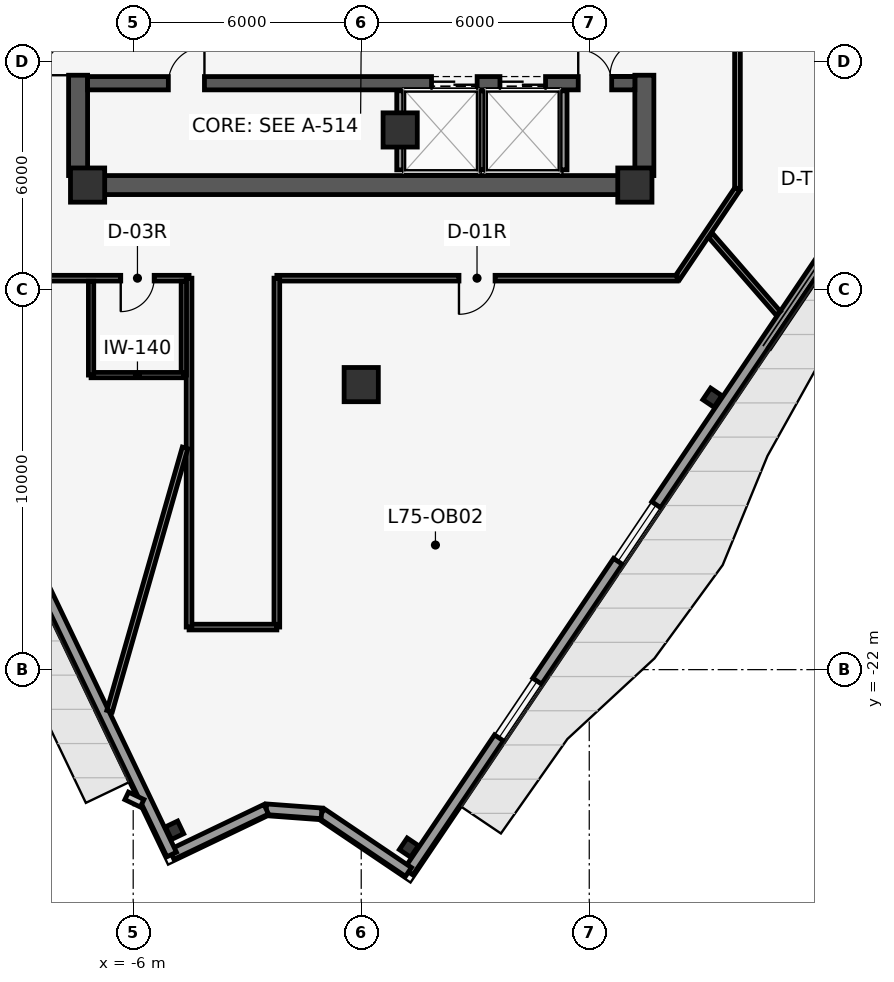
"""IFC4 building model, lengths in metres.
Left out: names, types, materials, properties, quantities, classifications, styles, units other than length and angle.
Written with IfcOpenShell. Run it as: python <this file> out.ifc"""

import sys

from ifc_helpers import new_model, si_unit, direction, frame, frame_2d, origin, origin_2d, place, context, subcontext, project, spatial, rectangle, i_section, extrude, element, fill, save


model = new_model("IFC4")
c1 = context("Model", 3, precision=1e-05, world=origin(), true_north=direction((0.0, 1.0)))
c2 = subcontext(c1, "Body", "Model", "MODEL_VIEW")
j1 = project(units=[si_unit("LENGTHUNIT", "METRE"), si_unit("PLANEANGLEUNIT", "RADIAN")], contexts=[c1])
p1 = place(None, origin())
s1 = spatial("IfcSite", under=j1, at=p1, CompositionType="ELEMENT")
p2 = place(p1, origin())
s2 = spatial("IfcBuilding", under=s1, at=p2, CompositionType="ELEMENT")
p3 = place(p2, frame((0.0, 0.0, 318.8)))
s3 = spatial("IfcBuildingStorey", under=s2, at=p3, CompositionType="ELEMENT", Elevation=318.8)
p4 = place(p3, frame((-7.45, -9.0, 0.0), z_axis=(0.0, 0.0, 1.0), x_axis=(0.0, 1.0, 0.0)))
e1 = element("IfcWall", 1, at=p4, inside=s3, PredefinedType="SHEAR", context=c2, shape_type="SweptSolid", body=[
    extrude(rectangle(XDim=9.1, YDim=0.5, at=frame_2d((4.55, 0.0))), origin(), (0.0, 0.0, 1.0), 4.32),
])
p5 = place(p4, frame((2.64, 0.0, 0.0)))
e2 = element("IfcOpeningElement", 2, at=p5, cuts=e1, PredefinedType="OPENING", context=c2, shape_type="SweptSolid", body=[
    extrude(rectangle(XDim=1.8, YDim=2.2, at=frame_2d((0.9, 1.1))), frame((0.0, 0.26, 0.0), z_axis=(0.0, -1.0, 0.0), x_axis=(1.0, 0.0, 0.0)), (0.0, 0.0, 1.0), 0.52),
])
p6 = place(p4, frame((7.55, 0.0, 0.0)))
e3 = element("IfcOpeningElement", 3, at=p6, cuts=e1, PredefinedType="OPENING", context=c2, shape_type="SweptSolid", body=[
    extrude(rectangle(XDim=1.2, YDim=2.15, at=frame_2d((0.6, 1.075))), frame((0.0, 0.26, 0.0), z_axis=(0.0, -1.0, 0.0), x_axis=(1.0, 0.0, 0.0)), (0.0, 0.0, 1.0), 0.52),
])
p7 = place(p3, frame((7.45, -9.0, 0.0), z_axis=(0.0, 0.0, 1.0), x_axis=(0.0, 1.0, 0.0)))
e4 = element("IfcWall", 4, at=p7, inside=s3, PredefinedType="SHEAR", context=c2, shape_type="SweptSolid", body=[
    extrude(rectangle(XDim=9.1, YDim=0.5, at=frame_2d((4.55, 0.0))), origin(), (0.0, 0.0, 1.0), 4.32),
])
p8 = place(p7, frame((2.64, 0.0, 0.0)))
e5 = element("IfcOpeningElement", 5, at=p8, cuts=e4, PredefinedType="OPENING", context=c2, shape_type="SweptSolid", body=[
    extrude(rectangle(XDim=1.8, YDim=2.2, at=frame_2d((0.9, 1.1))), frame((0.0, 0.26, 0.0), z_axis=(0.0, -1.0, 0.0), x_axis=(1.0, 0.0, 0.0)), (0.0, 0.0, 1.0), 0.52),
])
p9 = place(p7, frame((7.55, 0.0, 0.0)))
e6 = element("IfcOpeningElement", 6, at=p9, cuts=e4, PredefinedType="OPENING", context=c2, shape_type="SweptSolid", body=[
    extrude(rectangle(XDim=1.2, YDim=2.15, at=frame_2d((0.6, 1.075))), frame((0.0, 0.26, 0.0), z_axis=(0.0, -1.0, 0.0), x_axis=(1.0, 0.0, 0.0)), (0.0, 0.0, 1.0), 0.52),
])
p10 = place(p3, frame((-7.45, -9.25, 0.0), z_axis=(0.0, 0.0, 1.0), x_axis=(1.0, 0.0, 0.0)))
e7 = element("IfcWall", 7, at=p10, inside=s3, PredefinedType="SHEAR", context=c2, shape_type="SweptSolid", body=[
    extrude(rectangle(XDim=14.9, YDim=0.5, at=frame_2d((7.45, 0.0))), origin(), (0.0, 0.0, 1.0), 4.32),
])
p11 = place(p3, frame((-7.2, -6.57, 0.0), z_axis=(0.0, 0.0, 1.0), x_axis=(1.0, 0.0, 0.0)))
e8 = element("IfcWall", 8, at=p11, inside=s3, PredefinedType="SHEAR", context=c2, shape_type="SweptSolid", body=[
    extrude(rectangle(XDim=14.4, YDim=0.35, at=frame_2d((7.2, 0.0))), origin(), (0.0, 0.0, 1.0), 4.32),
])
p12 = place(p11, frame((9.05, 0.0, 0.0)))
e9 = element("IfcOpeningElement", 9, at=p12, cuts=e8, PredefinedType="OPENING", context=c2, shape_type="SweptSolid", body=[
    extrude(rectangle(XDim=1.2, YDim=2.25, at=frame_2d((0.6, 1.125))), frame((0.0, 0.185, 0.0), z_axis=(0.0, -1.0, 0.0), x_axis=(1.0, 0.0, 0.0)), (0.0, 0.0, 1.0), 0.37),
])
p13 = place(p11, frame((10.85, 0.0, 0.0)))
e10 = element("IfcOpeningElement", 10, at=p13, cuts=e8, PredefinedType="OPENING", context=c2, shape_type="SweptSolid", body=[
    extrude(rectangle(XDim=1.2, YDim=2.25, at=frame_2d((0.6, 1.125))), frame((0.0, 0.185, 0.0), z_axis=(0.0, -1.0, 0.0), x_axis=(1.0, 0.0, 0.0)), (0.0, 0.0, 1.0), 0.37),
])
p14 = place(p11, frame((2.125, 0.0, 0.0)))
e11 = element("IfcOpeningElement", 11, at=p14, cuts=e8, PredefinedType="OPENING", context=c2, shape_type="SweptSolid", body=[
    extrude(rectangle(XDim=0.95, YDim=2.15, at=frame_2d((0.475, 1.075))), frame((0.0, 0.185, 0.0), z_axis=(0.0, -1.0, 0.0), x_axis=(1.0, 0.0, 0.0)), (0.0, 0.0, 1.0), 0.37),
])
p15 = place(p11, frame((12.91, 0.0, 0.0)))
e12 = element("IfcOpeningElement", 12, at=p15, cuts=e8, PredefinedType="OPENING", context=c2, shape_type="SweptSolid", body=[
    extrude(rectangle(XDim=0.88, YDim=2.15, at=frame_2d((0.44, 1.075))), frame((0.0, 0.185, 0.0), z_axis=(0.0, -1.0, 0.0), x_axis=(1.0, 0.0, 0.0)), (0.0, 0.0, 1.0), 0.37),
])
for number, where, z_axis, x_axis in (
    (13, (-7.2, -9.25, 0.0), (0.0, 0.0, 1.0), (1.0, 0.0, 0.0)),
    (14, (7.2, -9.25, 0.0), (0.0, 0.0, 1.0), (1.0, 0.0, 0.0)),
    (15, (1.025, -7.8, 0.0), (0.0, 0.0, 1.0), (1.0, 0.0, 0.0)),
    (16, (0.0, -14.5, 0.0), (0.0, 0.0, 1.0), (1.0, 0.0, 0.0)),
):
    element("IfcColumn", number, at=place(p3, frame(where, z_axis=z_axis, x_axis=x_axis)), inside=s3, PredefinedType="COLUMN", context=c2, shape_type="SweptSolid", body=[
        extrude(rectangle(XDim=0.9, YDim=0.9, at=origin_2d()), origin(), (0.0, 0.0, 1.0), 4.6),
    ])
for number, where, z_axis, x_axis in (
    (17, (-4.912, -26.227, 0.0), (0.0, 0.0, 1.0), (-0.431, 0.902, 0.0)),
    (18, (1.254, -26.682, 0.0), (0.0, 0.0, 1.0), (0.559, 0.829, 0.0)),
    (19, (9.239, -14.844, 0.0), (0.0, 0.0, 1.0), (0.559, 0.829, 0.0)),
):
    element("IfcColumn", number, at=place(p3, frame(where, z_axis=z_axis, x_axis=x_axis)), inside=s3, PredefinedType="COLUMN", context=c2, shape_type="SweptSolid", body=[
        extrude(i_section(OverallWidth=0.368, OverallDepth=0.356, WebThickness=0.011, FlangeThickness=0.018, at=origin_2d()), origin(), (0.0, 0.0, 1.0), 4.6),
    ])
p16 = place(p3, frame((25.8, 9.083, 0.0), z_axis=(0.0, 0.0, 1.0), x_axis=(-0.55919392155, -0.829036885851, 0.0)))
e20 = element("IfcWall", 20, at=p16, inside=s3, PredefinedType="STANDARD", context=c2, shape_type="SweptSolid", body=[
    extrude(rectangle(XDim=43.915, YDim=0.28, at=frame_2d((21.958, 0.0))), origin(), (0.0, 0.0, 1.0), 4.32),
])
p17 = place(p16, frame((21.457, 0.0, 0.0)))
e21 = element("IfcOpeningElement", 21, at=p17, cuts=e20, PredefinedType="OPENING", context=c2, shape_type="SweptSolid", body=[
    extrude(rectangle(XDim=1.0, YDim=2.15, at=frame_2d((0.5, 1.075))), frame((0.0, 0.15, 0.0), z_axis=(0.0, -1.0, 0.0), x_axis=(1.0, 0.0, 0.0)), (0.0, 0.0, 1.0), 0.3),
])
p18 = place(p16, frame((4.257, 0.0, 0.85)))
e22 = element("IfcOpeningElement", 22, at=p18, cuts=e20, PredefinedType="OPENING", context=c2, shape_type="SweptSolid", body=[
    extrude(rectangle(XDim=1.8, YDim=2.4, at=frame_2d((0.9, 1.2))), frame((0.0, 0.15, 0.0), z_axis=(0.0, -1.0, 0.0), x_axis=(1.0, 0.0, 0.0)), (0.0, 0.0, 1.0), 0.3),
])
p19 = place(p16, frame((9.857, 0.0, 0.85)))
e23 = element("IfcOpeningElement", 23, at=p19, cuts=e20, PredefinedType="OPENING", context=c2, shape_type="SweptSolid", body=[
    extrude(rectangle(XDim=1.8, YDim=2.4, at=frame_2d((0.9, 1.2))), frame((0.0, 0.15, 0.0), z_axis=(0.0, -1.0, 0.0), x_axis=(1.0, 0.0, 0.0)), (0.0, 0.0, 1.0), 0.3),
])
p20 = place(p16, frame((32.257, 0.0, 0.85)))
e24 = element("IfcOpeningElement", 24, at=p20, cuts=e20, PredefinedType="OPENING", context=c2, shape_type="SweptSolid", body=[
    extrude(rectangle(XDim=1.8, YDim=2.4, at=frame_2d((0.9, 1.2))), frame((0.0, 0.15, 0.0), z_axis=(0.0, -1.0, 0.0), x_axis=(1.0, 0.0, 0.0)), (0.0, 0.0, 1.0), 0.3),
])
p21 = place(p16, frame((37.857, 0.0, 0.85)))
e25 = element("IfcOpeningElement", 25, at=p21, cuts=e20, PredefinedType="OPENING", context=c2, shape_type="SweptSolid", body=[
    extrude(rectangle(XDim=1.8, YDim=2.4, at=frame_2d((0.9, 1.2))), frame((0.0, 0.15, 0.0), z_axis=(0.0, -1.0, 0.0), x_axis=(1.0, 0.0, 0.0)), (0.0, 0.0, 1.0), 0.3),
])
p22 = place(p3, frame((1.243, -27.324, 0.0), z_axis=(0.0, 0.0, 1.0), x_axis=(-0.829015842911, 0.559225117643, 0.0)))
e26 = element("IfcWall", 26, at=p22, inside=s3, PredefinedType="STANDARD", context=c2, shape_type="SweptSolid", body=[
    extrude(rectangle(XDim=2.759, YDim=0.28, at=frame_2d((1.379, 0.0))), origin(), (0.0, 0.0, 1.0), 4.32),
])
p23 = place(p3, frame((-1.044, -25.781, 0.0), z_axis=(0.0, 0.0, 1.0), x_axis=(-0.997286893261, 0.073612855735, 0.0)))
e27 = element("IfcWall", 27, at=p23, inside=s3, PredefinedType="STANDARD", context=c2, shape_type="SweptSolid", body=[
    extrude(rectangle(XDim=1.459, YDim=0.28, at=frame_2d((0.729, 0.0))), origin(), (0.0, 0.0, 1.0), 4.32),
])
p24 = place(p3, frame((-2.5, -25.674, 0.0), z_axis=(0.0, 0.0, 1.0), x_axis=(-0.902044352952, -0.431643354296, 0.0)))
e28 = element("IfcWall", 28, at=p24, inside=s3, PredefinedType="STANDARD", context=c2, shape_type="SweptSolid", body=[
    extrude(rectangle(XDim=2.759, YDim=0.28, at=frame_2d((1.379, 0.0))), origin(), (0.0, 0.0, 1.0), 4.32),
])
p25 = place(p3, frame((-4.988, -26.865, 0.0), z_axis=(0.0, 0.0, 1.0), x_axis=(-0.431592936847, 0.902068476815, 0.0)))
e29 = element("IfcWall", 29, at=p25, inside=s3, PredefinedType="STANDARD", context=c2, shape_type="SweptSolid", body=[
    extrude(rectangle(XDim=43.18, YDim=0.28, at=frame_2d((21.59, 0.0))), origin(), (0.0, 0.0, 1.0), 4.32),
])
p26 = place(p25, frame((18.499, 0.0, 0.0)))
e30 = element("IfcOpeningElement", 30, at=p26, cuts=e29, PredefinedType="OPENING", context=c2, shape_type="SweptSolid", body=[
    extrude(rectangle(XDim=1.0, YDim=2.15, at=frame_2d((0.5, 1.075))), frame((0.0, 0.15, 0.0), z_axis=(0.0, -1.0, 0.0), x_axis=(1.0, 0.0, 0.0)), (0.0, 0.0, 1.0), 0.3),
])
p27 = place(p25, frame((9.49, 0.0, 0.85)))
e31 = element("IfcOpeningElement", 31, at=p27, cuts=e29, PredefinedType="OPENING", context=c2, shape_type="SweptSolid", body=[
    extrude(rectangle(XDim=1.8, YDim=2.4, at=frame_2d((0.9, 1.2))), frame((0.0, 0.15, 0.0), z_axis=(0.0, -1.0, 0.0), x_axis=(1.0, 0.0, 0.0)), (0.0, 0.0, 1.0), 0.3),
])
p28 = place(p25, frame((31.89, 0.0, 0.85)))
e32 = element("IfcOpeningElement", 32, at=p28, cuts=e29, PredefinedType="OPENING", context=c2, shape_type="SweptSolid", body=[
    extrude(rectangle(XDim=1.8, YDim=2.4, at=frame_2d((0.9, 1.2))), frame((0.0, 0.15, 0.0), z_axis=(0.0, -1.0, 0.0), x_axis=(1.0, 0.0, 0.0)), (0.0, 0.0, 1.0), 0.3),
])
p29 = place(p25, frame((37.49, 0.0, 0.85)))
e33 = element("IfcOpeningElement", 33, at=p29, cuts=e29, PredefinedType="OPENING", context=c2, shape_type="SweptSolid", body=[
    extrude(rectangle(XDim=1.8, YDim=2.4, at=frame_2d((0.9, 1.2))), frame((0.0, 0.15, 0.0), z_axis=(0.0, -1.0, 0.0), x_axis=(1.0, 0.0, 0.0)), (0.0, 0.0, 1.0), 0.3),
])
p30 = place(p3, frame((1.025, -8.85, 0.0), z_axis=(0.0, 0.0, 1.0), x_axis=(0.0, 1.0, 0.0)))
e34 = element("IfcWall", 34, at=p30, inside=s3, PredefinedType="PARTITIONING", context=c2, shape_type="SweptSolid", body=[
    extrude(rectangle(XDim=2.08, YDim=0.18, at=frame_2d((1.04, 0.0))), origin(), (0.0, 0.0, 1.0), 3.368),
])
p31 = place(p3, frame((3.175, -8.85, 0.0), z_axis=(0.0, 0.0, 1.0), x_axis=(0.0, 1.0, 0.0)))
e35 = element("IfcWall", 35, at=p31, inside=s3, PredefinedType="PARTITIONING", context=c2, shape_type="SweptSolid", body=[
    extrude(rectangle(XDim=2.08, YDim=0.15, at=frame_2d((1.04, 0.0))), origin(), (0.0, 0.0, 1.0), 4.32),
])
p32 = place(p3, frame((5.325, -8.85, 0.0), z_axis=(0.0, 0.0, 1.0), x_axis=(0.0, 1.0, 0.0)))
e36 = element("IfcWall", 36, at=p32, inside=s3, PredefinedType="PARTITIONING", context=c2, shape_type="SweptSolid", body=[
    extrude(rectangle(XDim=2.08, YDim=0.18, at=frame_2d((1.04, 0.0))), origin(), (0.0, 0.0, 1.0), 4.32),
])
p33 = place(p3, frame((-4.53, -11.7, 0.0), z_axis=(0.0, 0.0, 1.0), x_axis=(-1.0, 0.0, 0.0)))
e37 = element("IfcWall", 37, at=p33, inside=s3, PredefinedType="PARTITIONING", context=c2, shape_type="SweptSolid", body=[
    extrude(rectangle(XDim=4.526, YDim=0.15, at=frame_2d((2.263, 0.0))), origin(), (0.0, 0.0, 1.0), 4.32),
])
p34 = place(p33, frame((0.918, 0.0, 0.0)))
e38 = element("IfcOpeningElement", 38, at=p34, cuts=e37, PredefinedType="OPENING", context=c2, shape_type="SweptSolid", body=[
    extrude(rectangle(XDim=0.88, YDim=2.1, at=frame_2d((0.44, 1.05))), frame((0.0, 0.085, 0.0), z_axis=(0.0, -1.0, 0.0), x_axis=(1.0, 0.0, 0.0)), (0.0, 0.0, 1.0), 0.17),
])
p35 = place(p3, frame((9.9, 11.85, 0.0), z_axis=(0.0, 0.0, 1.0), x_axis=(0.0, -1.0, 0.0)))
e39 = element("IfcWall", 39, at=p35, inside=s3, PredefinedType="PARTITIONING", context=c2, shape_type="SweptSolid", body=[
    extrude(rectangle(XDim=21.198, YDim=0.15, at=frame_2d((10.599, 0.0))), origin(), (0.0, 0.0, 1.0), 4.32),
])
p36 = place(p35, frame((15.22, 0.0, 0.0)))
e40 = element("IfcOpeningElement", 40, at=p36, cuts=e39, PredefinedType="OPENING", context=c2, shape_type="SweptSolid", body=[
    extrude(rectangle(XDim=0.95, YDim=2.15, at=frame_2d((0.475, 1.075))), frame((0.0, 0.085, 0.0), z_axis=(0.0, -1.0, 0.0), x_axis=(1.0, 0.0, 0.0)), (0.0, 0.0, 1.0), 0.17),
])
p37 = place(p35, frame((4.875, 0.0, 0.0)))
e41 = element("IfcOpeningElement", 41, at=p37, cuts=e39, PredefinedType="OPENING", context=c2, shape_type="SweptSolid", body=[
    extrude(rectangle(XDim=0.95, YDim=2.15, at=frame_2d((0.475, 1.075))), frame((0.0, 0.085, 0.0), z_axis=(0.0, -1.0, 0.0), x_axis=(1.0, 0.0, 0.0)), (0.0, 0.0, 1.0), 0.17),
])
p38 = place(p3, frame((9.9, -9.348, 0.0), z_axis=(0.0, 0.0, 1.0), x_axis=(-0.559200828408, -0.829032227062, 0.0)))
e42 = element("IfcWall", 42, at=p38, inside=s3, PredefinedType="PARTITIONING", context=c2, shape_type="SweptSolid", body=[
    extrude(rectangle(XDim=2.836, YDim=0.15, at=frame_2d((1.418, 0.0))), origin(), (0.0, 0.0, 1.0), 4.32),
])
p39 = place(p3, frame((8.314, -11.7, 0.0), z_axis=(0.0, 0.0, 1.0), x_axis=(-1.0, 0.0, 0.0)))
e43 = element("IfcWall", 43, at=p39, inside=s3, PredefinedType="PARTITIONING", context=c2, shape_type="SweptSolid", body=[
    extrude(rectangle(XDim=10.534, YDim=0.15, at=frame_2d((5.267, 0.0))), origin(), (0.0, 0.0, 1.0), 4.32),
])
p40 = place(p39, frame((4.792, 0.0, 0.0)))
e44 = element("IfcOpeningElement", 44, at=p40, cuts=e43, PredefinedType="OPENING", context=c2, shape_type="SweptSolid", body=[
    extrude(rectangle(XDim=0.95, YDim=2.15, at=frame_2d((0.475, 1.075))), frame((0.0, 0.085, 0.0), z_axis=(0.0, -1.0, 0.0), x_axis=(1.0, 0.0, 0.0)), (0.0, 0.0, 1.0), 0.17),
])
p41 = place(p3, frame((-2.22, -11.7, 0.0), z_axis=(0.0, 0.0, 1.0), x_axis=(0.0, -1.0, 0.0)))
e45 = element("IfcWall", 45, at=p41, inside=s3, PredefinedType="PARTITIONING", context=c2, shape_type="SweptSolid", body=[
    extrude(rectangle(XDim=9.18, YDim=0.15, at=frame_2d((4.59, 0.0))), origin(), (0.0, 0.0, 1.0), 4.32),
])
p42 = place(p3, frame((-2.22, -20.88, 0.0), z_axis=(0.0, 0.0, 1.0), x_axis=(-1.0, 0.0, 0.0)))
e46 = element("IfcWall", 46, at=p42, inside=s3, PredefinedType="PARTITIONING", context=c2, shape_type="SweptSolid", body=[
    extrude(rectangle(XDim=2.31, YDim=0.15, at=frame_2d((1.155, 0.0))), origin(), (0.0, 0.0, 1.0), 4.32),
])
p43 = place(p3, frame((-4.53, -20.88, 0.0), z_axis=(0.0, 0.0, 1.0), x_axis=(0.0, 1.0, 0.0)))
e47 = element("IfcWall", 47, at=p43, inside=s3, PredefinedType="PARTITIONING", context=c2, shape_type="SweptSolid", body=[
    extrude(rectangle(XDim=9.18, YDim=0.15, at=frame_2d((4.59, 0.0))), origin(), (0.0, 0.0, 1.0), 4.32),
])
p44 = place(p3, frame((-4.635, -16.164, 0.0), z_axis=(0.0, 0.0, 1.0), x_axis=(-0.275624824413, -0.961265289172, 0.0)))
e48 = element("IfcWall", 48, at=p44, inside=s3, PredefinedType="PARTITIONING", context=c2, shape_type="SweptSolid", body=[
    extrude(rectangle(XDim=7.207, YDim=0.15, at=frame_2d((3.603, 0.0))), origin(), (0.0, 0.0, 1.0), 4.32),
])
p45 = place(p3, frame((9.196, -10.579, 0.0), z_axis=(0.0, 0.0, 1.0), x_axis=(0.656055910676, -0.754712290921, 0.0)))
e49 = element("IfcWall", 49, at=p45, inside=s3, PredefinedType="PARTITIONING", context=c2, shape_type="SweptSolid", body=[
    extrude(rectangle(XDim=2.707, YDim=0.15, at=frame_2d((1.354, 0.0))), origin(), (0.0, 0.0, 1.0), 4.32),
])
p46 = place(p3, frame((-4.668, -11.78, 0.0), z_axis=(0.0, 0.0, 1.0), x_axis=(0.0, -1.0, 0.0)))
e50 = element("IfcWall", 50, at=p46, inside=s3, PredefinedType="PARTITIONING", context=c2, shape_type="SweptSolid", body=[
    extrude(rectangle(XDim=2.47, YDim=0.14, at=frame_2d((1.235, 0.0))), origin(), (0.0, 0.0, 1.0), 4.32),
])
p47 = place(p3, frame((-4.668, -14.25, 0.0), z_axis=(0.0, 0.0, 1.0), x_axis=(-1.0, 0.0, 0.0)))
e51 = element("IfcWall", 51, at=p47, inside=s3, PredefinedType="PARTITIONING", context=c2, shape_type="SweptSolid", body=[
    extrude(rectangle(XDim=2.44, YDim=0.14, at=frame_2d((1.22, 0.0))), origin(), (0.0, 0.0, 1.0), 4.32),
])
p48 = place(p3, frame((-7.108, -14.25, 0.0), z_axis=(0.0, 0.0, 1.0), x_axis=(0.0, 1.0, 0.0)))
e52 = element("IfcWall", 52, at=p48, inside=s3, PredefinedType="PARTITIONING", context=c2, shape_type="SweptSolid", body=[
    extrude(rectangle(XDim=2.47, YDim=0.14, at=frame_2d((1.235, 0.0))), origin(), (0.0, 0.0, 1.0), 4.32),
])
p49 = place(p20, origin())
e53 = element("IfcWindow", 53, at=p49, inside=s3, PartitioningType="DOUBLE_PANEL_VERTICAL", PredefinedType="WINDOW", context=c2, shape_type="SweptSolid", body=[
    extrude(rectangle(XDim=1.8, YDim=2.4, at=frame_2d((0.9, 1.2))), frame((0.0, 0.03, 0.0), z_axis=(0.0, -1.0, 0.0), x_axis=(1.0, 0.0, 0.0)), (0.0, 0.0, 1.0), 0.06),
])
fill(e24, e53)
p50 = place(p21, origin())
e54 = element("IfcWindow", 54, at=p50, inside=s3, PartitioningType="DOUBLE_PANEL_VERTICAL", PredefinedType="WINDOW", context=c2, shape_type="SweptSolid", body=[
    extrude(rectangle(XDim=1.8, YDim=2.4, at=frame_2d((0.9, 1.2))), frame((0.0, 0.03, 0.0), z_axis=(0.0, -1.0, 0.0), x_axis=(1.0, 0.0, 0.0)), (0.0, 0.0, 1.0), 0.06),
])
fill(e25, e54)
p51 = place(p12, origin())
e55 = element("IfcDoor", 55, at=p51, inside=s3, OperationType="DOUBLE_DOOR_SLIDING", PredefinedType="DOOR", context=c2, shape_type="SweptSolid", body=[
    extrude(rectangle(XDim=1.2, YDim=2.25, at=frame_2d((0.6, 1.125))), frame((0.0, 0.025, 0.0), z_axis=(0.0, -1.0, 0.0), x_axis=(1.0, 0.0, 0.0)), (0.0, 0.0, 1.0), 0.05),
])
fill(e9, e55)
p52 = place(p13, origin())
e56 = element("IfcDoor", 56, at=p52, inside=s3, OperationType="DOUBLE_DOOR_SLIDING", PredefinedType="DOOR", context=c2, shape_type="SweptSolid", body=[
    extrude(rectangle(XDim=1.2, YDim=2.25, at=frame_2d((0.6, 1.125))), frame((0.0, 0.025, 0.0), z_axis=(0.0, -1.0, 0.0), x_axis=(1.0, 0.0, 0.0)), (0.0, 0.0, 1.0), 0.05),
])
fill(e10, e56)
p53 = place(p5, origin())
e57 = element("IfcDoor", 57, at=p53, inside=s3, OperationType="DOUBLE_DOOR_SINGLE_SWING", PredefinedType="DOOR", context=c2, shape_type="SweptSolid", body=[
    extrude(rectangle(XDim=1.8, YDim=2.2, at=frame_2d((0.9, 1.1))), frame((0.0, 0.025, 0.0), z_axis=(0.0, -1.0, 0.0), x_axis=(1.0, 0.0, 0.0)), (0.0, 0.0, 1.0), 0.05),
])
fill(e2, e57)
p54 = place(p8, origin())
e58 = element("IfcDoor", 58, at=p54, inside=s3, OperationType="DOUBLE_DOOR_SINGLE_SWING", PredefinedType="DOOR", context=c2, shape_type="SweptSolid", body=[
    extrude(rectangle(XDim=1.8, YDim=2.2, at=frame_2d((0.9, 1.1))), frame((0.0, 0.025, 0.0), z_axis=(0.0, -1.0, 0.0), x_axis=(1.0, 0.0, 0.0)), (0.0, 0.0, 1.0), 0.05),
])
fill(e5, e58)
p55 = place(p14, origin())
e59 = element("IfcDoor", 59, at=p55, inside=s3, OperationType="SINGLE_SWING_RIGHT", PredefinedType="DOOR", context=c2, shape_type="SweptSolid", body=[
    extrude(rectangle(XDim=0.95, YDim=2.15, at=frame_2d((0.475, 1.075))), frame((0.0, 0.025, 0.0), z_axis=(0.0, -1.0, 0.0), x_axis=(1.0, 0.0, 0.0)), (0.0, 0.0, 1.0), 0.05),
])
fill(e11, e59)
p56 = place(p15, origin())
e60 = element("IfcDoor", 60, at=p56, inside=s3, OperationType="SINGLE_SWING_LEFT", PredefinedType="DOOR", context=c2, shape_type="SweptSolid", body=[
    extrude(rectangle(XDim=0.88, YDim=2.15, at=frame_2d((0.44, 1.075))), frame((0.0, 0.025, 0.0), z_axis=(0.0, -1.0, 0.0), x_axis=(1.0, 0.0, 0.0)), (0.0, 0.0, 1.0), 0.05),
])
fill(e12, e60)
p57 = place(p34, origin())
e61 = element("IfcDoor", 61, at=p57, inside=s3, OperationType="SINGLE_SWING_RIGHT", PredefinedType="DOOR", context=c2, shape_type="SweptSolid", body=[
    extrude(rectangle(XDim=0.88, YDim=2.1, at=frame_2d((0.44, 1.05))), frame((0.0, 0.025, 0.0), z_axis=(0.0, -1.0, 0.0), x_axis=(1.0, 0.0, 0.0)), (0.0, 0.0, 1.0), 0.05),
])
fill(e38, e61)
p58 = place(p40, origin())
e62 = element("IfcDoor", 62, at=p58, inside=s3, OperationType="SINGLE_SWING_RIGHT", PredefinedType="DOOR", context=c2, shape_type="SweptSolid", body=[
    extrude(rectangle(XDim=0.95, YDim=2.15, at=frame_2d((0.475, 1.075))), frame((0.0, 0.025, 0.0), z_axis=(0.0, -1.0, 0.0), x_axis=(1.0, 0.0, 0.0)), (0.0, 0.0, 1.0), 0.05),
])
fill(e44, e62)
save(model, sys.argv[1])
